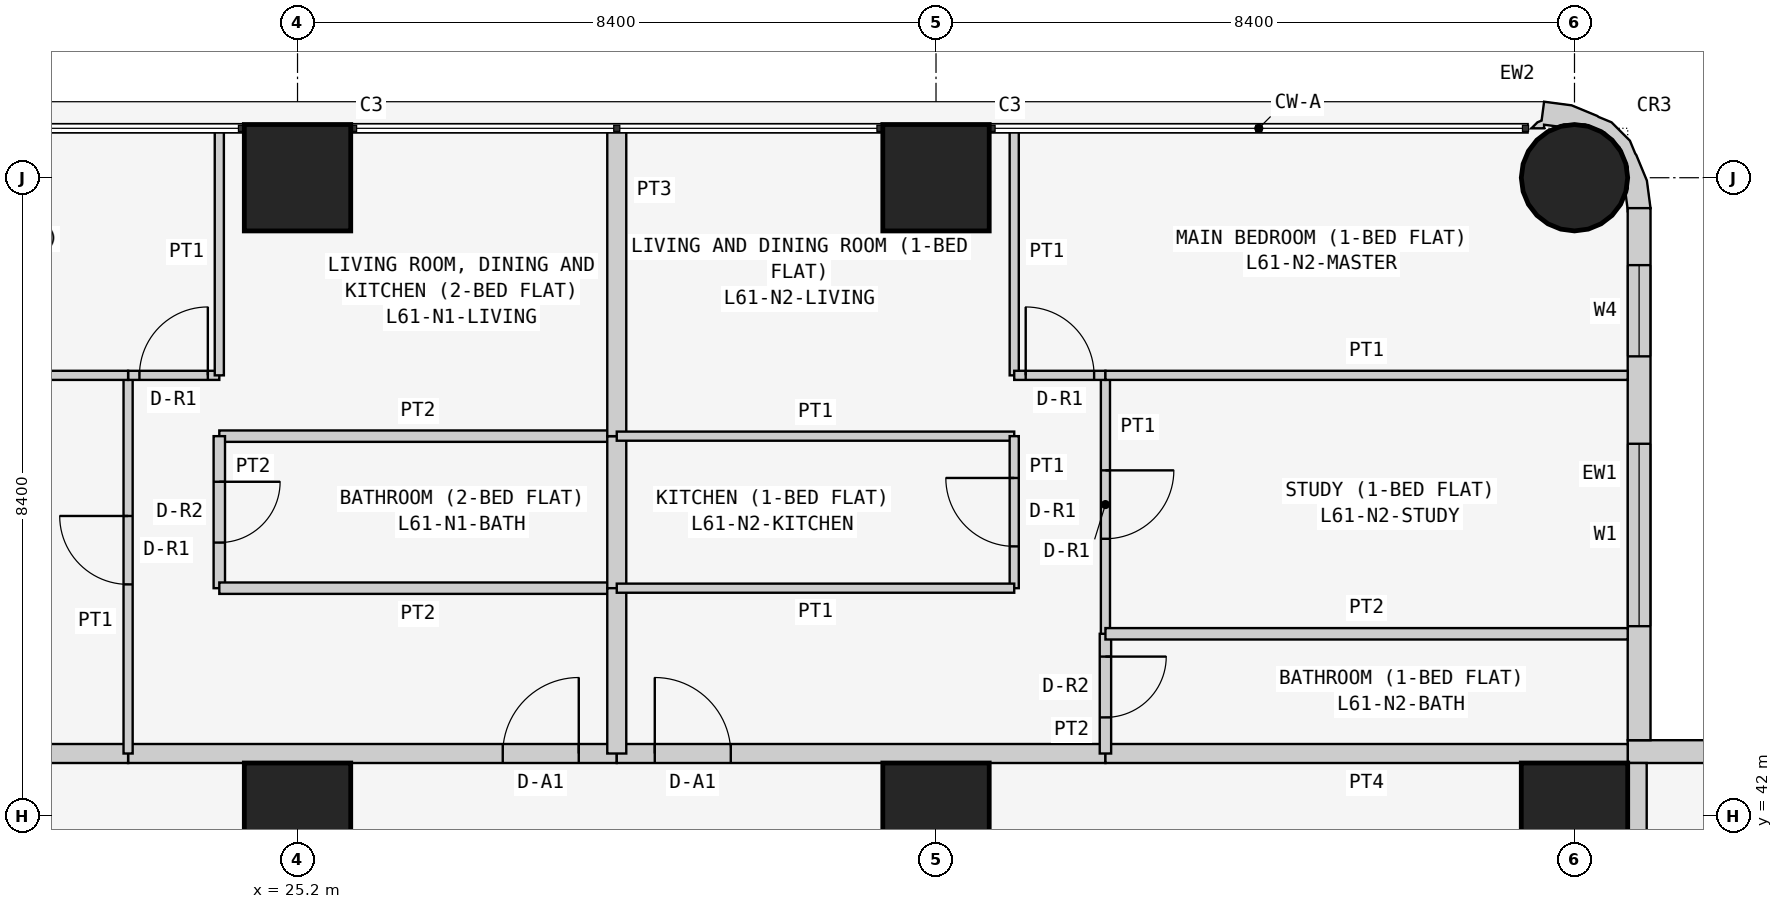
"""IFC4 building model, lengths in metres.
Left out: names, types, materials, properties, quantities, classifications, styles, units other than length and angle.
Written with IfcOpenShell. Run it as: python <this file> out.ifc"""

import sys

from ifc_helpers import new_model, si_unit, direction, frame, frame_2d, origin, origin_2d, place, context, subcontext, project, spatial, polyline, rectangle, circle, outline, extrude, element, fill, save


model = new_model("IFC4")
c1 = context("Model", 3, precision=1e-05, world=origin(), true_north=direction((0.0, 1.0)))
c2 = subcontext(c1, "Body", "Model", "MODEL_VIEW")
j1 = project(units=[si_unit("LENGTHUNIT", "METRE"), si_unit("PLANEANGLEUNIT", "RADIAN")], contexts=[c1])
p1 = place(None, origin())
s1 = spatial("IfcSite", under=j1, at=p1, CompositionType="ELEMENT")
p2 = place(p1, origin())
s2 = spatial("IfcBuilding", under=s1, at=p2, CompositionType="ELEMENT")
p3 = place(p2, frame((0.0, 0.0, 233.7)))
s3 = spatial("IfcBuildingStorey", under=s2, at=p3, CompositionType="ELEMENT", Elevation=233.7)
for number, where, z_axis, x_axis in (
    (1, (25.2, 42.0, 0.0), (0.0, 0.0, 1.0), (1.0, 0.0, 0.0)),
    (2, (25.2, 50.4, 0.0), (0.0, 0.0, 1.0), (1.0, 0.0, 0.0)),
    (3, (33.6, 42.0, 0.0), (0.0, 0.0, 1.0), (1.0, 0.0, 0.0)),
    (4, (33.6, 50.4, 0.0), (0.0, 0.0, 1.0), (1.0, 0.0, 0.0)),
    (5, (42.0, 42.0, 0.0), (0.0, 0.0, 1.0), (1.0, 0.0, 0.0)),
):
    element("IfcColumn", number, at=place(p3, frame(where, z_axis=z_axis, x_axis=x_axis)), inside=s3, PredefinedType="COLUMN", context=c2, shape_type="SweptSolid", body=[
        extrude(rectangle(XDim=1.4, YDim=1.4, at=origin_2d()), origin(), (0.0, 0.0, 1.0), 3.6),
    ])
p4 = place(p3, frame((42.0, 50.4, 0.0), z_axis=(0.0, 0.0, 1.0), x_axis=(1.0, 0.0, 0.0)))
e6 = element("IfcColumn", 6, at=p4, inside=s3, PredefinedType="COLUMN", context=c2, shape_type="SweptSolid", body=[
    extrude(circle(Radius=0.7, at=origin_2d()), origin(), (0.0, 0.0, 1.0), 3.6),
])
p5 = place(p3, frame((50.0, 42.85, 0.0), z_axis=(0.0, 0.0, 1.0), x_axis=(-1.0, 0.0, 0.0)))
e7 = element("IfcWall", 7, at=p5, inside=s3, PredefinedType="SOLIDWALL", context=c2, shape_type="SweptSolid", body=[
    extrude(rectangle(XDim=7.3, YDim=0.3, at=frame_2d((3.65, 0.0))), origin(), (0.0, 0.0, 1.0), 3.45),
])
p6 = place(p5, frame((3.1, 0.0, 0.9)))
e8 = element("IfcOpeningElement", 8, at=p6, cuts=e7, PredefinedType="OPENING", context=c2, shape_type="SweptSolid", body=[
    extrude(rectangle(XDim=2.4, YDim=1.5, at=frame_2d((1.2, 0.75))), frame((0.0, 0.16, 0.0), z_axis=(0.0, -1.0, 0.0), x_axis=(1.0, 0.0, 0.0)), (0.0, 0.0, 1.0), 0.32),
])
p7 = place(p5, frame((0.75, 0.0, 0.9)))
e9 = element("IfcOpeningElement", 9, at=p7, cuts=e7, PredefinedType="OPENING", context=c2, shape_type="SweptSolid", body=[
    extrude(rectangle(XDim=1.2, YDim=1.5, at=frame_2d((0.6, 0.75))), frame((0.0, 0.16, 0.0), z_axis=(0.0, -1.0, 0.0), x_axis=(1.0, 0.0, 0.0)), (0.0, 0.0, 1.0), 0.32),
])
p8 = place(p3, frame((42.85, 43.0, 0.0), z_axis=(0.0, 0.0, 1.0), x_axis=(0.0, 1.0, 0.0)))
e10 = element("IfcWall", 10, at=p8, inside=s3, PredefinedType="SOLIDWALL", context=c2, shape_type="SweptSolid", body=[
    extrude(rectangle(XDim=7.0, YDim=0.3, at=frame_2d((3.5, 0.0))), origin(), (0.0, 0.0, 1.0), 3.45),
])
p9 = place(p8, frame((1.5, 0.0, 0.9)))
e11 = element("IfcOpeningElement", 11, at=p9, cuts=e10, PredefinedType="OPENING", context=c2, shape_type="SweptSolid", body=[
    extrude(rectangle(XDim=2.4, YDim=1.5, at=frame_2d((1.2, 0.75))), frame((0.0, 0.16, 0.0), z_axis=(0.0, -1.0, 0.0), x_axis=(1.0, 0.0, 0.0)), (0.0, 0.0, 1.0), 0.32),
])
p10 = place(p8, frame((5.05, 0.0, 0.9)))
e12 = element("IfcOpeningElement", 12, at=p10, cuts=e10, PredefinedType="OPENING", context=c2, shape_type="SweptSolid", body=[
    extrude(rectangle(XDim=1.2, YDim=1.5, at=frame_2d((0.6, 0.75))), frame((0.0, 0.16, 0.0), z_axis=(0.0, -1.0, 0.0), x_axis=(1.0, 0.0, 0.0)), (0.0, 0.0, 1.0), 0.32),
])
p11 = place(p3, frame((42.724, 50.11, 0.0), z_axis=(0.0, 0.0, 1.0), x_axis=(0.439933741929, 0.898030234854, 0.0)))
e13 = element("IfcWall", 13, at=p11, inside=s3, PredefinedType="SOLIDWALL", context=c2, shape_type="SweptSolid", body=[
    extrude(outline(polyline([(-0.145, -0.044), (0.022, -0.296), (0.327, -0.094), (0.568, 0.18), (0.577, 0.199), (0.7, 0.337), (0.811, 0.661), (0.799, 0.845), (0.803, 0.866), (0.78, 1.231), (0.664, 1.577), (0.426, 1.497), (0.382, 1.536), (0.276, 1.572), (0.349, 1.423), (0.392, 1.444), (0.453, 1.261), (0.51, 1.211), (0.632, 0.961), (0.65, 0.683), (0.56, 0.419), (0.375, 0.21), (0.125, 0.087), (0.05, 0.082), (-0.127, -0.035), (-0.145, -0.044)])), origin(), (0.0, 0.0, 1.0), 3.45),
])
p12 = place(p3, frame((22.971, 42.825, 0.0), z_axis=(0.0, 0.0, 1.0), x_axis=(1.0, 0.0, 0.0)))
e14 = element("IfcWall", 14, at=p12, inside=s3, PredefinedType="PARTITIONING", context=c2, shape_type="SweptSolid", body=[
    extrude(rectangle(XDim=6.429, YDim=0.25, at=frame_2d((3.214, 0.0))), origin(), (0.0, 0.0, 1.0), 3.45),
])
p13 = place(p12, frame((4.929, 0.0, 0.0)))
e15 = element("IfcOpeningElement", 15, at=p13, cuts=e14, PredefinedType="OPENING", context=c2, shape_type="SweptSolid", body=[
    extrude(rectangle(XDim=1.0, YDim=2.1, at=frame_2d((0.5, 1.05))), frame((0.0, 0.135, 0.0), z_axis=(0.0, -1.0, 0.0), x_axis=(1.0, 0.0, 0.0)), (0.0, 0.0, 1.0), 0.27),
])
p14 = place(p3, frame((16.1, 42.825, 0.0), z_axis=(0.0, 0.0, 1.0), x_axis=(1.0, 0.0, 0.0)))
e16 = element("IfcWall", 16, at=p14, inside=s3, PredefinedType="PARTITIONING", context=c2, shape_type="SweptSolid", body=[
    extrude(rectangle(XDim=6.871, YDim=0.25, at=frame_2d((3.436, 0.0))), origin(), (0.0, 0.0, 1.0), 3.45),
])
p15 = place(p3, frame((29.4, 42.825, 0.0), z_axis=(0.0, 0.0, 1.0), x_axis=(1.0, 0.0, 0.0)))
e17 = element("IfcWall", 17, at=p15, inside=s3, PredefinedType="PARTITIONING", context=c2, shape_type="SweptSolid", body=[
    extrude(rectangle(XDim=6.429, YDim=0.25, at=frame_2d((3.215, 0.0))), origin(), (0.0, 0.0, 1.0), 3.45),
])
p16 = place(p15, frame((0.5, 0.0, 0.0)))
e18 = element("IfcOpeningElement", 18, at=p16, cuts=e17, PredefinedType="OPENING", context=c2, shape_type="SweptSolid", body=[
    extrude(rectangle(XDim=1.0, YDim=2.1, at=frame_2d((0.5, 1.05))), frame((0.0, 0.135, 0.0), z_axis=(0.0, -1.0, 0.0), x_axis=(1.0, 0.0, 0.0)), (0.0, 0.0, 1.0), 0.27),
])
for number, where, z_axis, x_axis in (
    (19, (35.829, 42.825, 0.0), (0.0, 0.0, 1.0), (1.0, 0.0, 0.0)),
    (20, (42.825, 42.7, 0.0), (0.0, 0.0, 1.0), (0.0, -1.0, 0.0)),
):
    element("IfcWall", number, at=place(p3, frame(where, z_axis=z_axis, x_axis=x_axis)), inside=s3, PredefinedType="PARTITIONING", context=c2, shape_type="SweptSolid", body=[
        extrude(rectangle(XDim=6.871, YDim=0.25, at=frame_2d((3.436, 0.0))), origin(), (0.0, 0.0, 1.0), 3.45),
    ])
p17 = place(p3, frame((29.4, 47.0, 0.0), z_axis=(0.0, 0.0, 1.0), x_axis=(-1.0, 0.0, 0.0)))
e21 = element("IfcWall", 21, at=p17, inside=s3, PredefinedType="PARTITIONING", context=c2, shape_type="SweptSolid", body=[
    extrude(rectangle(XDim=5.229, YDim=0.15, at=frame_2d((2.615, 0.0))), origin(), (0.0, 0.0, 1.0), 3.45),
])
p18 = place(p3, frame((24.171, 47.0, 0.0), z_axis=(0.0, 0.0, 1.0), x_axis=(0.0, -1.0, 0.0)))
e22 = element("IfcWall", 22, at=p18, inside=s3, PredefinedType="PARTITIONING", context=c2, shape_type="SweptSolid", body=[
    extrude(rectangle(XDim=2.0, YDim=0.15, at=frame_2d((1.0, 0.0))), origin(), (0.0, 0.0, 1.0), 3.45),
])
p19 = place(p18, frame((0.6, 0.0, 0.0)))
e23 = element("IfcOpeningElement", 23, at=p19, cuts=e22, PredefinedType="OPENING", context=c2, shape_type="SweptSolid", body=[
    extrude(rectangle(XDim=0.8, YDim=2.1, at=frame_2d((0.4, 1.05))), frame((0.0, 0.085, 0.0), z_axis=(0.0, -1.0, 0.0), x_axis=(1.0, 0.0, 0.0)), (0.0, 0.0, 1.0), 0.17),
])
p20 = place(p3, frame((24.171, 45.0, 0.0), z_axis=(0.0, 0.0, 1.0), x_axis=(1.0, 0.0, 0.0)))
e24 = element("IfcWall", 24, at=p20, inside=s3, PredefinedType="PARTITIONING", context=c2, shape_type="SweptSolid", body=[
    extrude(rectangle(XDim=5.229, YDim=0.15, at=frame_2d((2.615, 0.0))), origin(), (0.0, 0.0, 1.0), 3.45),
])
p21 = place(p3, frame((29.4, 45.0, 0.0), z_axis=(0.0, 0.0, 1.0), x_axis=(0.0, 1.0, 0.0)))
e25 = element("IfcWall", 25, at=p21, inside=s3, PredefinedType="PARTITIONING", context=c2, shape_type="SweptSolid", body=[
    extrude(rectangle(XDim=2.0, YDim=0.25, at=frame_2d((1.0, 0.0))), origin(), (0.0, 0.0, 1.0), 2.848),
])
p22 = place(p3, frame((22.971, 42.825, 0.0), z_axis=(0.0, 0.0, 1.0), x_axis=(0.0, 1.0, 0.0)))
e26 = element("IfcWall", 26, at=p22, inside=s3, PredefinedType="PARTITIONING", context=c2, shape_type="SweptSolid", body=[
    extrude(rectangle(XDim=4.975, YDim=0.12, at=frame_2d((2.488, 0.0))), origin(), (0.0, 0.0, 1.0), 3.45),
])
p23 = place(p22, frame((2.225, 0.0, 0.0)))
e27 = element("IfcOpeningElement", 27, at=p23, cuts=e26, PredefinedType="OPENING", context=c2, shape_type="SweptSolid", body=[
    extrude(rectangle(XDim=0.9, YDim=2.1, at=frame_2d((0.45, 1.05))), frame((0.0, 0.07, 0.0), z_axis=(0.0, -1.0, 0.0), x_axis=(1.0, 0.0, 0.0)), (0.0, 0.0, 1.0), 0.14),
])
p24 = place(p3, frame((22.971, 47.8, 0.0), z_axis=(0.0, 0.0, 1.0), x_axis=(1.0, 0.0, 0.0)))
e28 = element("IfcWall", 28, at=p24, inside=s3, PredefinedType="PARTITIONING", context=c2, shape_type="SweptSolid", body=[
    extrude(rectangle(XDim=1.2, YDim=0.12, at=frame_2d((0.6, 0.0))), origin(), (0.0, 0.0, 1.0), 3.45),
])
p25 = place(p24, frame((0.149, 0.0, 0.0)))
e29 = element("IfcOpeningElement", 29, at=p25, cuts=e28, PredefinedType="OPENING", context=c2, shape_type="SweptSolid", body=[
    extrude(rectangle(XDim=0.9, YDim=2.1, at=frame_2d((0.45, 1.05))), frame((0.0, 0.07, 0.0), z_axis=(0.0, -1.0, 0.0), x_axis=(1.0, 0.0, 0.0)), (0.0, 0.0, 1.0), 0.14),
])
p26 = place(p3, frame((24.171, 47.8, 0.0), z_axis=(0.0, 0.0, 1.0), x_axis=(0.0, 1.0, 0.0)))
e30 = element("IfcWall", 30, at=p26, inside=s3, PredefinedType="PARTITIONING", context=c2, shape_type="SweptSolid", body=[
    extrude(rectangle(XDim=3.25, YDim=0.12, at=frame_2d((1.625, 0.0))), origin(), (0.0, 0.0, 1.0), 3.45),
])
p27 = place(p3, frame((29.4, 45.0, 0.0), z_axis=(0.0, 0.0, 1.0), x_axis=(0.0, -1.0, 0.0)))
e31 = element("IfcWall", 31, at=p27, inside=s3, PredefinedType="PARTITIONING", context=c2, shape_type="SweptSolid", body=[
    extrude(rectangle(XDim=2.175, YDim=0.25, at=frame_2d((1.087, 0.0))), origin(), (0.0, 0.0, 1.0), 2.848),
])
p28 = place(p3, frame((29.4, 51.05, 0.0), z_axis=(0.0, 0.0, 1.0), x_axis=(0.0, -1.0, 0.0)))
e32 = element("IfcWall", 32, at=p28, inside=s3, PredefinedType="PARTITIONING", context=c2, shape_type="SweptSolid", body=[
    extrude(rectangle(XDim=4.05, YDim=0.25, at=frame_2d((2.025, 0.0))), origin(), (0.0, 0.0, 1.0), 2.848),
])
p29 = place(p3, frame((22.971, 47.8, 0.0), z_axis=(0.0, 0.0, 1.0), x_axis=(-1.0, 0.0, 0.0)))
e33 = element("IfcWall", 33, at=p29, inside=s3, PredefinedType="PARTITIONING", context=c2, shape_type="SweptSolid", body=[
    extrude(rectangle(XDim=6.871, YDim=0.12, at=frame_2d((3.436, 0.0))), origin(), (0.0, 0.0, 1.0), 3.45),
])
p30 = place(p3, frame((29.4, 47.0, 0.0), z_axis=(0.0, 0.0, 1.0), x_axis=(1.0, 0.0, 0.0)))
e34 = element("IfcWall", 34, at=p30, inside=s3, PredefinedType="PARTITIONING", context=c2, shape_type="SweptSolid", body=[
    extrude(rectangle(XDim=5.229, YDim=0.12, at=frame_2d((2.615, 0.0))), origin(), (0.0, 0.0, 1.0), 3.45),
])
p31 = place(p3, frame((34.629, 47.0, 0.0), z_axis=(0.0, 0.0, 1.0), x_axis=(0.0, -1.0, 0.0)))
e35 = element("IfcWall", 35, at=p31, inside=s3, PredefinedType="PARTITIONING", context=c2, shape_type="SweptSolid", body=[
    extrude(rectangle(XDim=2.0, YDim=0.12, at=frame_2d((1.0, 0.0))), origin(), (0.0, 0.0, 1.0), 3.45),
])
p32 = place(p31, frame((0.55, 0.0, 0.0)))
e36 = element("IfcOpeningElement", 36, at=p32, cuts=e35, PredefinedType="OPENING", context=c2, shape_type="SweptSolid", body=[
    extrude(rectangle(XDim=0.9, YDim=2.1, at=frame_2d((0.45, 1.05))), frame((0.0, 0.07, 0.0), z_axis=(0.0, -1.0, 0.0), x_axis=(1.0, 0.0, 0.0)), (0.0, 0.0, 1.0), 0.14),
])
p33 = place(p3, frame((34.629, 45.0, 0.0), z_axis=(0.0, 0.0, 1.0), x_axis=(-1.0, 0.0, 0.0)))
e37 = element("IfcWall", 37, at=p33, inside=s3, PredefinedType="PARTITIONING", context=c2, shape_type="SweptSolid", body=[
    extrude(rectangle(XDim=5.229, YDim=0.12, at=frame_2d((2.615, 0.0))), origin(), (0.0, 0.0, 1.0), 3.45),
])
p34 = place(p3, frame((35.829, 44.4, 0.0), z_axis=(0.0, 0.0, 1.0), x_axis=(0.0, -1.0, 0.0)))
e38 = element("IfcWall", 38, at=p34, inside=s3, PredefinedType="PARTITIONING", context=c2, shape_type="SweptSolid", body=[
    extrude(rectangle(XDim=1.575, YDim=0.15, at=frame_2d((0.788, 0.0))), origin(), (0.0, 0.0, 1.0), 3.45),
])
p35 = place(p34, frame((0.3, 0.0, 0.0)))
e39 = element("IfcOpeningElement", 39, at=p35, cuts=e38, PredefinedType="OPENING", context=c2, shape_type="SweptSolid", body=[
    extrude(rectangle(XDim=0.8, YDim=2.1, at=frame_2d((0.4, 1.05))), frame((0.0, 0.085, 0.0), z_axis=(0.0, -1.0, 0.0), x_axis=(1.0, 0.0, 0.0)), (0.0, 0.0, 1.0), 0.17),
])
p36 = place(p3, frame((35.829, 47.8, 0.0), z_axis=(0.0, 0.0, 1.0), x_axis=(0.0, -1.0, 0.0)))
e40 = element("IfcWall", 40, at=p36, inside=s3, PredefinedType="PARTITIONING", context=c2, shape_type="SweptSolid", body=[
    extrude(rectangle(XDim=3.4, YDim=0.12, at=frame_2d((1.7, 0.0))), origin(), (0.0, 0.0, 1.0), 3.45),
])
p37 = place(p36, frame((1.25, 0.0, 0.0)))
e41 = element("IfcOpeningElement", 41, at=p37, cuts=e40, PredefinedType="OPENING", context=c2, shape_type="SweptSolid", body=[
    extrude(rectangle(XDim=0.9, YDim=2.1, at=frame_2d((0.45, 1.05))), frame((0.0, 0.07, 0.0), z_axis=(0.0, -1.0, 0.0), x_axis=(1.0, 0.0, 0.0)), (0.0, 0.0, 1.0), 0.14),
])
p38 = place(p3, frame((34.629, 51.05, 0.0), z_axis=(0.0, 0.0, 1.0), x_axis=(0.0, -1.0, 0.0)))
e42 = element("IfcWall", 42, at=p38, inside=s3, PredefinedType="PARTITIONING", context=c2, shape_type="SweptSolid", body=[
    extrude(rectangle(XDim=3.25, YDim=0.12, at=frame_2d((1.625, 0.0))), origin(), (0.0, 0.0, 1.0), 3.45),
])
p39 = place(p3, frame((34.629, 47.8, 0.0), z_axis=(0.0, 0.0, 1.0), x_axis=(1.0, 0.0, 0.0)))
e43 = element("IfcWall", 43, at=p39, inside=s3, PredefinedType="PARTITIONING", context=c2, shape_type="SweptSolid", body=[
    extrude(rectangle(XDim=1.2, YDim=0.12, at=frame_2d((0.6, 0.0))), origin(), (0.0, 0.0, 1.0), 3.45),
])
p40 = place(p39, frame((0.151, 0.0, 0.0)))
e44 = element("IfcOpeningElement", 44, at=p40, cuts=e43, PredefinedType="OPENING", context=c2, shape_type="SweptSolid", body=[
    extrude(rectangle(XDim=0.9, YDim=2.1, at=frame_2d((0.45, 1.05))), frame((0.0, 0.07, 0.0), z_axis=(0.0, -1.0, 0.0), x_axis=(1.0, 0.0, 0.0)), (0.0, 0.0, 1.0), 0.14),
])
p41 = place(p3, frame((35.829, 44.4, 0.0), z_axis=(0.0, 0.0, 1.0), x_axis=(1.0, 0.0, 0.0)))
e45 = element("IfcWall", 45, at=p41, inside=s3, PredefinedType="PARTITIONING", context=c2, shape_type="SweptSolid", body=[
    extrude(rectangle(XDim=6.871, YDim=0.15, at=frame_2d((3.436, 0.0))), origin(), (0.0, 0.0, 1.0), 3.45),
])
p42 = place(p3, frame((35.829, 47.8, 0.0), z_axis=(0.0, 0.0, 1.0), x_axis=(1.0, 0.0, 0.0)))
e46 = element("IfcWall", 46, at=p42, inside=s3, PredefinedType="PARTITIONING", context=c2, shape_type="SweptSolid", body=[
    extrude(rectangle(XDim=6.871, YDim=0.12, at=frame_2d((3.436, 0.0))), origin(), (0.0, 0.0, 1.0), 3.45),
])
p43 = place(p9, origin())
e47 = element("IfcWindow", 47, at=p43, inside=s3, PartitioningType="SINGLE_PANEL", PredefinedType="WINDOW", context=c2, shape_type="SweptSolid", body=[
    extrude(rectangle(XDim=2.4, YDim=1.5, at=frame_2d((1.2, 0.75))), frame((0.0, 0.03, 0.0), z_axis=(0.0, -1.0, 0.0), x_axis=(1.0, 0.0, 0.0)), (0.0, 0.0, 1.0), 0.06),
])
fill(e11, e47)
p44 = place(p10, origin())
e48 = element("IfcWindow", 48, at=p44, inside=s3, PartitioningType="SINGLE_PANEL", PredefinedType="WINDOW", context=c2, shape_type="SweptSolid", body=[
    extrude(rectangle(XDim=1.2, YDim=1.5, at=frame_2d((0.6, 0.75))), frame((0.0, 0.03, 0.0), z_axis=(0.0, -1.0, 0.0), x_axis=(1.0, 0.0, 0.0)), (0.0, 0.0, 1.0), 0.06),
])
fill(e12, e48)
p45 = place(p13, origin())
e49 = element("IfcDoor", 49, at=p45, inside=s3, OperationType="SINGLE_SWING_RIGHT", PredefinedType="DOOR", context=c2, shape_type="SweptSolid", body=[
    extrude(rectangle(XDim=1.0, YDim=2.1, at=frame_2d((0.5, 1.05))), frame((0.0, 0.025, 0.0), z_axis=(0.0, -1.0, 0.0), x_axis=(1.0, 0.0, 0.0)), (0.0, 0.0, 1.0), 0.05),
])
fill(e15, e49)
p46 = place(p19, origin())
e50 = element("IfcDoor", 50, at=p46, inside=s3, OperationType="SINGLE_SWING_LEFT", PredefinedType="DOOR", context=c2, shape_type="SweptSolid", body=[
    extrude(rectangle(XDim=0.8, YDim=2.1, at=frame_2d((0.4, 1.05))), frame((0.0, 0.025, 0.0), z_axis=(0.0, -1.0, 0.0), x_axis=(1.0, 0.0, 0.0)), (0.0, 0.0, 1.0), 0.05),
])
fill(e23, e50)
p47 = place(p23, origin())
e51 = element("IfcDoor", 51, at=p47, inside=s3, OperationType="SINGLE_SWING_RIGHT", PredefinedType="DOOR", context=c2, shape_type="SweptSolid", body=[
    extrude(rectangle(XDim=0.9, YDim=2.1, at=frame_2d((0.45, 1.05))), frame((0.0, 0.025, 0.0), z_axis=(0.0, -1.0, 0.0), x_axis=(1.0, 0.0, 0.0)), (0.0, 0.0, 1.0), 0.05),
])
fill(e27, e51)
p48 = place(p25, origin())
e52 = element("IfcDoor", 52, at=p48, inside=s3, OperationType="SINGLE_SWING_RIGHT", PredefinedType="DOOR", context=c2, shape_type="SweptSolid", body=[
    extrude(rectangle(XDim=0.9, YDim=2.1, at=frame_2d((0.45, 1.05))), frame((0.0, 0.025, 0.0), z_axis=(0.0, -1.0, 0.0), x_axis=(1.0, 0.0, 0.0)), (0.0, 0.0, 1.0), 0.05),
])
fill(e29, e52)
p49 = place(p16, origin())
e53 = element("IfcDoor", 53, at=p49, inside=s3, OperationType="SINGLE_SWING_LEFT", PredefinedType="DOOR", context=c2, shape_type="SweptSolid", body=[
    extrude(rectangle(XDim=1.0, YDim=2.1, at=frame_2d((0.5, 1.05))), frame((0.0, 0.025, 0.0), z_axis=(0.0, -1.0, 0.0), x_axis=(1.0, 0.0, 0.0)), (0.0, 0.0, 1.0), 0.05),
])
fill(e18, e53)
p50 = place(p32, frame((0.9, 0.0, 0.0), z_axis=(0.0, 0.0, 1.0), x_axis=(-1.0, 0.0, 0.0)))
e54 = element("IfcDoor", 54, at=p50, inside=s3, OperationType="SINGLE_SWING_RIGHT", PredefinedType="DOOR", context=c2, shape_type="SweptSolid", body=[
    extrude(rectangle(XDim=0.9, YDim=2.1, at=frame_2d((0.45, 1.05))), frame((0.0, 0.025, 0.0), z_axis=(0.0, -1.0, 0.0), x_axis=(1.0, 0.0, 0.0)), (0.0, 0.0, 1.0), 0.05),
])
fill(e36, e54)
p51 = place(p35, origin())
e55 = element("IfcDoor", 55, at=p51, inside=s3, OperationType="SINGLE_SWING_LEFT", PredefinedType="DOOR", context=c2, shape_type="SweptSolid", body=[
    extrude(rectangle(XDim=0.8, YDim=2.1, at=frame_2d((0.4, 1.05))), frame((0.0, 0.025, 0.0), z_axis=(0.0, -1.0, 0.0), x_axis=(1.0, 0.0, 0.0)), (0.0, 0.0, 1.0), 0.05),
])
fill(e39, e55)
p52 = place(p37, origin())
e56 = element("IfcDoor", 56, at=p52, inside=s3, OperationType="SINGLE_SWING_LEFT", PredefinedType="DOOR", context=c2, shape_type="SweptSolid", body=[
    extrude(rectangle(XDim=0.9, YDim=2.1, at=frame_2d((0.45, 1.05))), frame((0.0, 0.025, 0.0), z_axis=(0.0, -1.0, 0.0), x_axis=(1.0, 0.0, 0.0)), (0.0, 0.0, 1.0), 0.05),
])
fill(e41, e56)
p53 = place(p40, origin())
e57 = element("IfcDoor", 57, at=p53, inside=s3, OperationType="SINGLE_SWING_LEFT", PredefinedType="DOOR", context=c2, shape_type="SweptSolid", body=[
    extrude(rectangle(XDim=0.9, YDim=2.1, at=frame_2d((0.45, 1.05))), frame((0.0, 0.025, 0.0), z_axis=(0.0, -1.0, 0.0), x_axis=(1.0, 0.0, 0.0)), (0.0, 0.0, 1.0), 0.05),
])
fill(e44, e57)
save(model, sys.argv[1])
